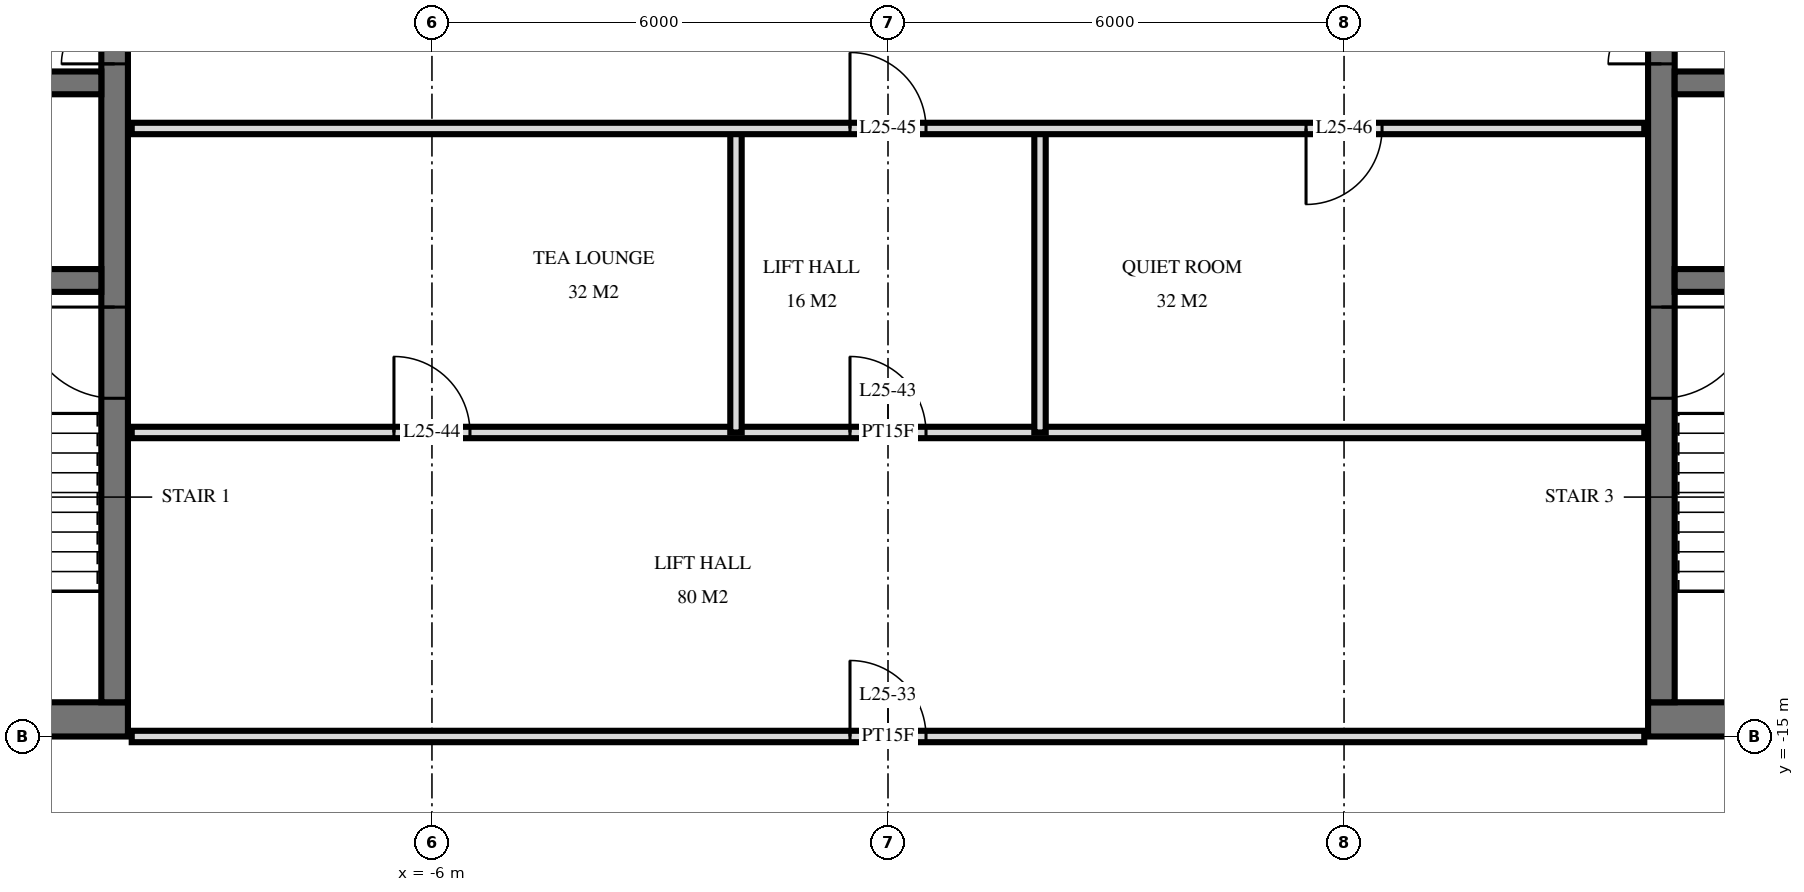
"""IFC4 building model, lengths in metres.
Left out: names, types, materials, properties, quantities, classifications, styles, units other than length and angle.
Written with IfcOpenShell. Run it as: python <this file> out.ifc"""

import sys

from ifc_helpers import new_model, si_unit, direction, frame, frame_2d, origin, place, context, subcontext, project, spatial, rectangle, extrude, element, fill, save


model = new_model("IFC4")
c1 = context("Model", 3, precision=1e-05, world=origin(), true_north=direction((0.0, 1.0)))
c2 = subcontext(c1, "Body", "Model", "MODEL_VIEW")
j1 = project(units=[si_unit("LENGTHUNIT", "METRE"), si_unit("PLANEANGLEUNIT", "RADIAN")], contexts=[c1])
p1 = place(None, origin())
s1 = spatial("IfcSite", under=j1, at=p1, CompositionType="ELEMENT")
p2 = place(p1, origin())
s2 = spatial("IfcBuilding", under=s1, at=p2, CompositionType="ELEMENT")
p3 = place(p2, frame((0.0, 0.0, 99.6)))
s3 = spatial("IfcBuildingStorey", under=s2, at=p3, CompositionType="ELEMENT", Elevation=99.6)
p4 = place(p3, frame((-29.5, -14.775, 0.0), z_axis=(0.0, 0.0, 1.0), x_axis=(1.0, 0.0, 0.0)))
e1 = element("IfcWall", 1, at=p4, inside=s3, PredefinedType="SHEAR", context=c2, shape_type="SweptSolid", body=[
    extrude(rectangle(XDim=19.5, YDim=0.45, at=frame_2d((9.75, 0.0))), origin(), (0.0, 0.0, 1.0), 3.6),
])
p5 = place(p4, frame((11.2, 0.0, 0.0)))
e2 = element("IfcOpeningElement", 2, at=p5, cuts=e1, PredefinedType="OPENING", context=c2, shape_type="SweptSolid", body=[
    extrude(rectangle(XDim=1.2, YDim=2.1, at=frame_2d((0.6, 1.05))), frame((0.0, 0.235, 0.0), z_axis=(0.0, -1.0, 0.0), x_axis=(1.0, 0.0, 0.0)), (0.0, 0.0, 1.0), 0.47),
])
p6 = place(p4, frame((14.25, 0.0, 0.0)))
e3 = element("IfcOpeningElement", 3, at=p6, cuts=e1, PredefinedType="OPENING", context=c2, shape_type="SweptSolid", body=[
    extrude(rectangle(XDim=1.1, YDim=2.1, at=frame_2d((0.55, 1.05))), frame((0.0, 0.235, 0.0), z_axis=(0.0, -1.0, 0.0), x_axis=(1.0, 0.0, 0.0)), (0.0, 0.0, 1.0), 0.47),
])
p7 = place(p4, frame((8.5, 0.0, 0.0)))
e4 = element("IfcOpeningElement", 4, at=p7, cuts=e1, PredefinedType="OPENING", context=c2, shape_type="SweptSolid", body=[
    extrude(rectangle(XDim=0.9, YDim=2.1, at=frame_2d((0.45, 1.05))), frame((0.0, 0.235, 0.0), z_axis=(0.0, -1.0, 0.0), x_axis=(1.0, 0.0, 0.0)), (0.0, 0.0, 1.0), 0.47),
])
p8 = place(p4, frame((6.05, 0.0, 0.0)))
e5 = element("IfcOpeningElement", 5, at=p8, cuts=e1, PredefinedType="OPENING", context=c2, shape_type="SweptSolid", body=[
    extrude(rectangle(XDim=1.0, YDim=2.1, at=frame_2d((0.5, 1.05))), frame((0.0, 0.235, 0.0), z_axis=(0.0, -1.0, 0.0), x_axis=(1.0, 0.0, 0.0)), (0.0, 0.0, 1.0), 0.47),
])
p9 = place(p4, frame((3.413, 0.0, 0.0)))
e6 = element("IfcOpeningElement", 6, at=p9, cuts=e1, PredefinedType="OPENING", context=c2, shape_type="SweptSolid", body=[
    extrude(rectangle(XDim=1.0, YDim=2.1, at=frame_2d((0.5, 1.05))), frame((0.0, 0.235, 0.0), z_axis=(0.0, -1.0, 0.0), x_axis=(1.0, 0.0, 0.0)), (0.0, 0.0, 1.0), 0.47),
])
p10 = place(p4, frame((1.087, 0.0, 0.0)))
e7 = element("IfcOpeningElement", 7, at=p10, cuts=e1, PredefinedType="OPENING", context=c2, shape_type="SweptSolid", body=[
    extrude(rectangle(XDim=1.0, YDim=2.1, at=frame_2d((0.5, 1.05))), frame((0.0, 0.235, 0.0), z_axis=(0.0, -1.0, 0.0), x_axis=(1.0, 0.0, 0.0)), (0.0, 0.0, 1.0), 0.47),
])
p11 = place(p3, frame((-10.175, -14.55, 0.0), z_axis=(0.0, 0.0, 1.0), x_axis=(0.0, 1.0, 0.0)))
e8 = element("IfcWall", 8, at=p11, inside=s3, PredefinedType="SHEAR", context=c2, shape_type="SweptSolid", body=[
    extrude(rectangle(XDim=14.1, YDim=0.35, at=frame_2d((7.05, 0.0))), origin(), (0.0, 0.0, 1.0), 3.6),
])
p12 = place(p11, frame((8.4, 0.0, 0.0)))
e9 = element("IfcOpeningElement", 9, at=p12, cuts=e8, PredefinedType="OPENING", context=c2, shape_type="SweptSolid", body=[
    extrude(rectangle(XDim=1.4, YDim=2.4, at=frame_2d((0.7, 1.2))), frame((0.0, 0.185, 0.0), z_axis=(0.0, -1.0, 0.0), x_axis=(1.0, 0.0, 0.0)), (0.0, 0.0, 1.0), 0.37),
])
p13 = place(p11, frame((10.0, 0.0, 0.0)))
e10 = element("IfcOpeningElement", 10, at=p13, cuts=e8, PredefinedType="OPENING", context=c2, shape_type="SweptSolid", body=[
    extrude(rectangle(XDim=1.4, YDim=2.4, at=frame_2d((0.7, 1.2))), frame((0.0, 0.185, 0.0), z_axis=(0.0, -1.0, 0.0), x_axis=(1.0, 0.0, 0.0)), (0.0, 0.0, 1.0), 0.37),
])
p14 = place(p11, frame((4.0, 0.0, 0.0)))
e11 = element("IfcOpeningElement", 11, at=p14, cuts=e8, PredefinedType="OPENING", context=c2, shape_type="SweptSolid", body=[
    extrude(rectangle(XDim=1.2, YDim=2.1, at=frame_2d((0.6, 1.05))), frame((0.0, 0.185, 0.0), z_axis=(0.0, -1.0, 0.0), x_axis=(1.0, 0.0, 0.0)), (0.0, 0.0, 1.0), 0.37),
])
p15 = place(p3, frame((-29.05, -6.4, 0.0), z_axis=(0.0, 0.0, 1.0), x_axis=(1.0, 0.0, 0.0)))
e12 = element("IfcWall", 12, at=p15, inside=s3, PredefinedType="SHEAR", context=c2, shape_type="SweptSolid", body=[
    extrude(rectangle(XDim=18.7, YDim=0.3, at=frame_2d((9.35, 0.0))), origin(), (0.0, 0.0, 1.0), 3.6),
])
p16 = place(p15, frame((2.95, 0.0, 0.0)))
e13 = element("IfcOpeningElement", 13, at=p16, cuts=e12, PredefinedType="OPENING", context=c2, shape_type="SweptSolid", body=[
    extrude(rectangle(XDim=1.1, YDim=2.1, at=frame_2d((0.55, 1.05))), frame((0.0, 0.16, 0.0), z_axis=(0.0, -1.0, 0.0), x_axis=(1.0, 0.0, 0.0)), (0.0, 0.0, 1.0), 0.32),
])
p17 = place(p15, frame((0.55, 0.0, 0.0)))
e14 = element("IfcOpeningElement", 14, at=p17, cuts=e12, PredefinedType="OPENING", context=c2, shape_type="SweptSolid", body=[
    extrude(rectangle(XDim=1.1, YDim=2.1, at=frame_2d((0.55, 1.05))), frame((0.0, 0.16, 0.0), z_axis=(0.0, -1.0, 0.0), x_axis=(1.0, 0.0, 0.0)), (0.0, 0.0, 1.0), 0.32),
])
p18 = place(p15, frame((10.8, 0.0, 0.0)))
e15 = element("IfcOpeningElement", 15, at=p18, cuts=e12, PredefinedType="OPENING", context=c2, shape_type="SweptSolid", body=[
    extrude(rectangle(XDim=1.1, YDim=2.1, at=frame_2d((0.55, 1.05))), frame((0.0, 0.16, 0.0), z_axis=(0.0, -1.0, 0.0), x_axis=(1.0, 0.0, 0.0)), (0.0, 0.0, 1.0), 0.32),
])
p19 = place(p15, frame((5.6, 0.0, 0.0)))
e16 = element("IfcOpeningElement", 16, at=p19, cuts=e12, PredefinedType="OPENING", context=c2, shape_type="SweptSolid", body=[
    extrude(rectangle(XDim=1.0, YDim=2.1, at=frame_2d((0.5, 1.05))), frame((0.0, 0.16, 0.0), z_axis=(0.0, -1.0, 0.0), x_axis=(1.0, 0.0, 0.0)), (0.0, 0.0, 1.0), 0.32),
])
p20 = place(p3, frame((-29.05, -9.0, 0.0), z_axis=(0.0, 0.0, 1.0), x_axis=(1.0, 0.0, 0.0)))
e17 = element("IfcWall", 17, at=p20, inside=s3, PredefinedType="SHEAR", context=c2, shape_type="SweptSolid", body=[
    extrude(rectangle(XDim=18.7, YDim=0.3, at=frame_2d((9.35, 0.0))), origin(), (0.0, 0.0, 1.0), 3.6),
])
p21 = place(p20, frame((13.8, 0.0, 0.0)))
e18 = element("IfcOpeningElement", 18, at=p21, cuts=e17, PredefinedType="OPENING", context=c2, shape_type="SweptSolid", body=[
    extrude(rectangle(XDim=1.1, YDim=2.1, at=frame_2d((0.55, 1.05))), frame((0.0, 0.16, 0.0), z_axis=(0.0, -1.0, 0.0), x_axis=(1.0, 0.0, 0.0)), (0.0, 0.0, 1.0), 0.32),
])
p22 = place(p3, frame((10.0, -14.775, 0.0), z_axis=(0.0, 0.0, 1.0), x_axis=(1.0, 0.0, 0.0)))
e19 = element("IfcWall", 19, at=p22, inside=s3, PredefinedType="SHEAR", context=c2, shape_type="SweptSolid", body=[
    extrude(rectangle(XDim=19.5, YDim=0.45, at=frame_2d((9.75, 0.0))), origin(), (0.0, 0.0, 1.0), 3.6),
])
p23 = place(p22, frame((7.1, 0.0, 0.0)))
e20 = element("IfcOpeningElement", 20, at=p23, cuts=e19, PredefinedType="OPENING", context=c2, shape_type="SweptSolid", body=[
    extrude(rectangle(XDim=1.2, YDim=2.1, at=frame_2d((0.6, 1.05))), frame((0.0, 0.235, 0.0), z_axis=(0.0, -1.0, 0.0), x_axis=(1.0, 0.0, 0.0)), (0.0, 0.0, 1.0), 0.47),
])
p24 = place(p22, frame((4.15, 0.0, 0.0)))
e21 = element("IfcOpeningElement", 21, at=p24, cuts=e19, PredefinedType="OPENING", context=c2, shape_type="SweptSolid", body=[
    extrude(rectangle(XDim=1.1, YDim=2.1, at=frame_2d((0.55, 1.05))), frame((0.0, 0.235, 0.0), z_axis=(0.0, -1.0, 0.0), x_axis=(1.0, 0.0, 0.0)), (0.0, 0.0, 1.0), 0.47),
])
p25 = place(p22, frame((10.1, 0.0, 0.0)))
e22 = element("IfcOpeningElement", 22, at=p25, cuts=e19, PredefinedType="OPENING", context=c2, shape_type="SweptSolid", body=[
    extrude(rectangle(XDim=0.9, YDim=2.1, at=frame_2d((0.45, 1.05))), frame((0.0, 0.235, 0.0), z_axis=(0.0, -1.0, 0.0), x_axis=(1.0, 0.0, 0.0)), (0.0, 0.0, 1.0), 0.47),
])
p26 = place(p22, frame((12.45, 0.0, 0.0)))
e23 = element("IfcOpeningElement", 23, at=p26, cuts=e19, PredefinedType="OPENING", context=c2, shape_type="SweptSolid", body=[
    extrude(rectangle(XDim=1.0, YDim=2.1, at=frame_2d((0.5, 1.05))), frame((0.0, 0.235, 0.0), z_axis=(0.0, -1.0, 0.0), x_axis=(1.0, 0.0, 0.0)), (0.0, 0.0, 1.0), 0.47),
])
p27 = place(p22, frame((15.087, 0.0, 0.0)))
e24 = element("IfcOpeningElement", 24, at=p27, cuts=e19, PredefinedType="OPENING", context=c2, shape_type="SweptSolid", body=[
    extrude(rectangle(XDim=1.0, YDim=2.1, at=frame_2d((0.5, 1.05))), frame((0.0, 0.235, 0.0), z_axis=(0.0, -1.0, 0.0), x_axis=(1.0, 0.0, 0.0)), (0.0, 0.0, 1.0), 0.47),
])
p28 = place(p22, frame((17.413, 0.0, 0.0)))
e25 = element("IfcOpeningElement", 25, at=p28, cuts=e19, PredefinedType="OPENING", context=c2, shape_type="SweptSolid", body=[
    extrude(rectangle(XDim=1.0, YDim=2.1, at=frame_2d((0.5, 1.05))), frame((0.0, 0.235, 0.0), z_axis=(0.0, -1.0, 0.0), x_axis=(1.0, 0.0, 0.0)), (0.0, 0.0, 1.0), 0.47),
])
p29 = place(p3, frame((10.175, -14.55, 0.0), z_axis=(0.0, 0.0, 1.0), x_axis=(0.0, 1.0, 0.0)))
e26 = element("IfcWall", 26, at=p29, inside=s3, PredefinedType="SHEAR", context=c2, shape_type="SweptSolid", body=[
    extrude(rectangle(XDim=14.1, YDim=0.35, at=frame_2d((7.05, 0.0))), origin(), (0.0, 0.0, 1.0), 3.6),
])
p30 = place(p29, frame((8.4, 0.0, 0.0)))
e27 = element("IfcOpeningElement", 27, at=p30, cuts=e26, PredefinedType="OPENING", context=c2, shape_type="SweptSolid", body=[
    extrude(rectangle(XDim=1.4, YDim=2.4, at=frame_2d((0.7, 1.2))), frame((0.0, 0.185, 0.0), z_axis=(0.0, -1.0, 0.0), x_axis=(1.0, 0.0, 0.0)), (0.0, 0.0, 1.0), 0.37),
])
p31 = place(p29, frame((10.0, 0.0, 0.0)))
e28 = element("IfcOpeningElement", 28, at=p31, cuts=e26, PredefinedType="OPENING", context=c2, shape_type="SweptSolid", body=[
    extrude(rectangle(XDim=1.4, YDim=2.4, at=frame_2d((0.7, 1.2))), frame((0.0, 0.185, 0.0), z_axis=(0.0, -1.0, 0.0), x_axis=(1.0, 0.0, 0.0)), (0.0, 0.0, 1.0), 0.37),
])
p32 = place(p29, frame((4.0, 0.0, 0.0)))
e29 = element("IfcOpeningElement", 29, at=p32, cuts=e26, PredefinedType="OPENING", context=c2, shape_type="SweptSolid", body=[
    extrude(rectangle(XDim=1.2, YDim=2.1, at=frame_2d((0.6, 1.05))), frame((0.0, 0.185, 0.0), z_axis=(0.0, -1.0, 0.0), x_axis=(1.0, 0.0, 0.0)), (0.0, 0.0, 1.0), 0.37),
])
p33 = place(p3, frame((10.35, -6.4, 0.0), z_axis=(0.0, 0.0, 1.0), x_axis=(1.0, 0.0, 0.0)))
e30 = element("IfcWall", 30, at=p33, inside=s3, PredefinedType="SHEAR", context=c2, shape_type="SweptSolid", body=[
    extrude(rectangle(XDim=18.7, YDim=0.3, at=frame_2d((9.35, 0.0))), origin(), (0.0, 0.0, 1.0), 3.6),
])
p34 = place(p33, frame((14.65, 0.0, 0.0)))
e31 = element("IfcOpeningElement", 31, at=p34, cuts=e30, PredefinedType="OPENING", context=c2, shape_type="SweptSolid", body=[
    extrude(rectangle(XDim=1.1, YDim=2.1, at=frame_2d((0.55, 1.05))), frame((0.0, 0.16, 0.0), z_axis=(0.0, -1.0, 0.0), x_axis=(1.0, 0.0, 0.0)), (0.0, 0.0, 1.0), 0.32),
])
p35 = place(p33, frame((17.05, 0.0, 0.0)))
e32 = element("IfcOpeningElement", 32, at=p35, cuts=e30, PredefinedType="OPENING", context=c2, shape_type="SweptSolid", body=[
    extrude(rectangle(XDim=1.1, YDim=2.1, at=frame_2d((0.55, 1.05))), frame((0.0, 0.16, 0.0), z_axis=(0.0, -1.0, 0.0), x_axis=(1.0, 0.0, 0.0)), (0.0, 0.0, 1.0), 0.32),
])
p36 = place(p33, frame((6.8, 0.0, 0.0)))
e33 = element("IfcOpeningElement", 33, at=p36, cuts=e30, PredefinedType="OPENING", context=c2, shape_type="SweptSolid", body=[
    extrude(rectangle(XDim=1.1, YDim=2.1, at=frame_2d((0.55, 1.05))), frame((0.0, 0.16, 0.0), z_axis=(0.0, -1.0, 0.0), x_axis=(1.0, 0.0, 0.0)), (0.0, 0.0, 1.0), 0.32),
])
p37 = place(p33, frame((12.1, 0.0, 0.0)))
e34 = element("IfcOpeningElement", 34, at=p37, cuts=e30, PredefinedType="OPENING", context=c2, shape_type="SweptSolid", body=[
    extrude(rectangle(XDim=1.0, YDim=2.1, at=frame_2d((0.5, 1.05))), frame((0.0, 0.16, 0.0), z_axis=(0.0, -1.0, 0.0), x_axis=(1.0, 0.0, 0.0)), (0.0, 0.0, 1.0), 0.32),
])
p38 = place(p3, frame((10.35, -9.0, 0.0), z_axis=(0.0, 0.0, 1.0), x_axis=(1.0, 0.0, 0.0)))
e35 = element("IfcWall", 35, at=p38, inside=s3, PredefinedType="SHEAR", context=c2, shape_type="SweptSolid", body=[
    extrude(rectangle(XDim=18.7, YDim=0.3, at=frame_2d((9.35, 0.0))), origin(), (0.0, 0.0, 1.0), 3.6),
])
p39 = place(p38, frame((3.8, 0.0, 0.0)))
e36 = element("IfcOpeningElement", 36, at=p39, cuts=e35, PredefinedType="OPENING", context=c2, shape_type="SweptSolid", body=[
    extrude(rectangle(XDim=1.1, YDim=2.1, at=frame_2d((0.55, 1.05))), frame((0.0, 0.16, 0.0), z_axis=(0.0, -1.0, 0.0), x_axis=(1.0, 0.0, 0.0)), (0.0, 0.0, 1.0), 0.32),
])
for number, where, z_axis, x_axis in (
    (37, (2.0, -11.0, 0.0), (0.0, 0.0, 1.0), (0.0, 1.0, 0.0)),
    (38, (-2.0, -11.0, 0.0), (0.0, 0.0, 1.0), (0.0, 1.0, 0.0)),
):
    element("IfcWall", number, at=place(p3, frame(where, z_axis=z_axis, x_axis=x_axis)), inside=s3, PredefinedType="PARTITIONING", context=c2, shape_type="SweptSolid", body=[
        extrude(rectangle(XDim=4.0, YDim=0.15, at=frame_2d((2.0, 0.0))), origin(), (0.0, 0.0, 1.0), 3.32),
    ])
p40 = place(p3, frame((-9.95, -15.0, 0.0), z_axis=(0.0, 0.0, 1.0), x_axis=(1.0, 0.0, 0.0)))
e39 = element("IfcWall", 39, at=p40, inside=s3, PredefinedType="PARTITIONING", context=c2, shape_type="SweptSolid", body=[
    extrude(rectangle(XDim=19.9, YDim=0.15, at=frame_2d((9.95, 0.0))), origin(), (0.0, 0.0, 1.0), 2.684),
])
p41 = place(p40, frame((9.45, 0.0, 0.0)))
e40 = element("IfcOpeningElement", 40, at=p41, cuts=e39, PredefinedType="OPENING", context=c2, shape_type="SweptSolid", body=[
    extrude(rectangle(XDim=1.0, YDim=2.1, at=frame_2d((0.5, 1.05))), frame((0.0, 0.085, 0.0), z_axis=(0.0, -1.0, 0.0), x_axis=(1.0, 0.0, 0.0)), (0.0, 0.0, 1.0), 0.17),
])
p42 = place(p3, frame((-9.95, -11.0, 0.0), z_axis=(0.0, 0.0, 1.0), x_axis=(1.0, 0.0, 0.0)))
e41 = element("IfcWall", 41, at=p42, inside=s3, PredefinedType="PARTITIONING", context=c2, shape_type="SweptSolid", body=[
    extrude(rectangle(XDim=19.9, YDim=0.15, at=frame_2d((9.95, 0.0))), origin(), (0.0, 0.0, 1.0), 3.32),
])
p43 = place(p42, frame((9.45, 0.0, 0.0)))
e42 = element("IfcOpeningElement", 42, at=p43, cuts=e41, PredefinedType="OPENING", context=c2, shape_type="SweptSolid", body=[
    extrude(rectangle(XDim=1.0, YDim=2.1, at=frame_2d((0.5, 1.05))), frame((0.0, 0.085, 0.0), z_axis=(0.0, -1.0, 0.0), x_axis=(1.0, 0.0, 0.0)), (0.0, 0.0, 1.0), 0.17),
])
p44 = place(p42, frame((3.45, 0.0, 0.0)))
e43 = element("IfcOpeningElement", 43, at=p44, cuts=e41, PredefinedType="OPENING", context=c2, shape_type="SweptSolid", body=[
    extrude(rectangle(XDim=1.0, YDim=2.1, at=frame_2d((0.5, 1.05))), frame((0.0, 0.085, 0.0), z_axis=(0.0, -1.0, 0.0), x_axis=(1.0, 0.0, 0.0)), (0.0, 0.0, 1.0), 0.17),
])
p45 = place(p3, frame((-9.95, -7.0, 0.0), z_axis=(0.0, 0.0, 1.0), x_axis=(1.0, 0.0, 0.0)))
e44 = element("IfcWall", 44, at=p45, inside=s3, PredefinedType="PARTITIONING", context=c2, shape_type="SweptSolid", body=[
    extrude(rectangle(XDim=19.9, YDim=0.15, at=frame_2d((9.95, 0.0))), origin(), (0.0, 0.0, 1.0), 3.32),
])
p46 = place(p45, frame((9.45, 0.0, 0.0)))
e45 = element("IfcOpeningElement", 45, at=p46, cuts=e44, PredefinedType="OPENING", context=c2, shape_type="SweptSolid", body=[
    extrude(rectangle(XDim=1.0, YDim=2.1, at=frame_2d((0.5, 1.05))), frame((0.0, 0.085, 0.0), z_axis=(0.0, -1.0, 0.0), x_axis=(1.0, 0.0, 0.0)), (0.0, 0.0, 1.0), 0.17),
])
p47 = place(p45, frame((15.45, 0.0, 0.0)))
e46 = element("IfcOpeningElement", 46, at=p47, cuts=e44, PredefinedType="OPENING", context=c2, shape_type="SweptSolid", body=[
    extrude(rectangle(XDim=1.0, YDim=2.1, at=frame_2d((0.5, 1.05))), frame((0.0, 0.085, 0.0), z_axis=(0.0, -1.0, 0.0), x_axis=(1.0, 0.0, 0.0)), (0.0, 0.0, 1.0), 0.17),
])
p48 = place(p12, origin())
e47 = element("IfcDoor", 47, at=p48, inside=s3, OperationType="DOUBLE_DOOR_SINGLE_SWING", PredefinedType="DOOR", context=c2, shape_type="SweptSolid", body=[
    extrude(rectangle(XDim=1.4, YDim=2.4, at=frame_2d((0.7, 1.2))), frame((0.0, 0.025, 0.0), z_axis=(0.0, -1.0, 0.0), x_axis=(1.0, 0.0, 0.0)), (0.0, 0.0, 1.0), 0.05),
])
fill(e9, e47)
p49 = place(p14, origin())
e48 = element("IfcDoor", 48, at=p49, inside=s3, OperationType="SINGLE_SWING_LEFT", PredefinedType="DOOR", context=c2, shape_type="SweptSolid", body=[
    extrude(rectangle(XDim=1.2, YDim=2.1, at=frame_2d((0.6, 1.05))), frame((0.0, 0.025, 0.0), z_axis=(0.0, -1.0, 0.0), x_axis=(1.0, 0.0, 0.0)), (0.0, 0.0, 1.0), 0.05),
])
fill(e11, e48)
p50 = place(p30, origin())
e49 = element("IfcDoor", 49, at=p50, inside=s3, OperationType="DOUBLE_DOOR_SINGLE_SWING", PredefinedType="DOOR", context=c2, shape_type="SweptSolid", body=[
    extrude(rectangle(XDim=1.4, YDim=2.4, at=frame_2d((0.7, 1.2))), frame((0.0, 0.025, 0.0), z_axis=(0.0, -1.0, 0.0), x_axis=(1.0, 0.0, 0.0)), (0.0, 0.0, 1.0), 0.05),
])
fill(e27, e49)
p51 = place(p32, frame((0.6, 0.0, 0.0), z_axis=(0.0, 0.0, 1.0), x_axis=(-1.0, 0.0, 0.0)))
e50 = element("IfcDoor", 50, at=p51, inside=s3, OperationType="SINGLE_SWING_RIGHT", PredefinedType="DOOR", context=c2, shape_type="SweptSolid", body=[
    extrude(rectangle(XDim=1.2, YDim=2.1, at=frame_2d((0.0, 1.05))), frame((0.0, -0.025, 0.0), z_axis=(0.0, 1.0, 0.0), x_axis=(-1.0, 0.0, 0.0)), (0.0, 0.0, 1.0), 0.05),
])
fill(e29, e50)
p52 = place(p41, origin())
e51 = element("IfcDoor", 51, at=p52, inside=s3, OperationType="SINGLE_SWING_RIGHT", PredefinedType="DOOR", context=c2, shape_type="SweptSolid", body=[
    extrude(rectangle(XDim=1.0, YDim=2.1, at=frame_2d((0.5, 1.05))), frame((0.0, 0.025, 0.0), z_axis=(0.0, -1.0, 0.0), x_axis=(1.0, 0.0, 0.0)), (0.0, 0.0, 1.0), 0.05),
])
fill(e40, e51)
p53 = place(p43, origin())
e52 = element("IfcDoor", 52, at=p53, inside=s3, OperationType="SINGLE_SWING_RIGHT", PredefinedType="DOOR", context=c2, shape_type="SweptSolid", body=[
    extrude(rectangle(XDim=1.0, YDim=2.1, at=frame_2d((0.5, 1.05))), frame((0.0, 0.025, 0.0), z_axis=(0.0, -1.0, 0.0), x_axis=(1.0, 0.0, 0.0)), (0.0, 0.0, 1.0), 0.05),
])
fill(e42, e52)
p54 = place(p44, origin())
e53 = element("IfcDoor", 53, at=p54, inside=s3, OperationType="SINGLE_SWING_RIGHT", PredefinedType="DOOR", context=c2, shape_type="SweptSolid", body=[
    extrude(rectangle(XDim=1.0, YDim=2.1, at=frame_2d((0.5, 1.05))), frame((0.0, 0.025, 0.0), z_axis=(0.0, -1.0, 0.0), x_axis=(1.0, 0.0, 0.0)), (0.0, 0.0, 1.0), 0.05),
])
fill(e43, e53)
p55 = place(p46, origin())
e54 = element("IfcDoor", 54, at=p55, inside=s3, OperationType="SINGLE_SWING_RIGHT", PredefinedType="DOOR", context=c2, shape_type="SweptSolid", body=[
    extrude(rectangle(XDim=1.0, YDim=2.1, at=frame_2d((0.5, 1.05))), frame((0.0, 0.025, 0.0), z_axis=(0.0, -1.0, 0.0), x_axis=(1.0, 0.0, 0.0)), (0.0, 0.0, 1.0), 0.05),
])
fill(e45, e54)
p56 = place(p47, frame((0.5, 0.0, 0.0), z_axis=(0.0, 0.0, 1.0), x_axis=(-1.0, 0.0, 0.0)))
e55 = element("IfcDoor", 55, at=p56, inside=s3, OperationType="SINGLE_SWING_LEFT", PredefinedType="DOOR", context=c2, shape_type="SweptSolid", body=[
    extrude(rectangle(XDim=1.0, YDim=2.1, at=frame_2d((0.0, 1.05))), frame((0.0, -0.025, 0.0), z_axis=(0.0, 1.0, 0.0), x_axis=(-1.0, 0.0, 0.0)), (0.0, 0.0, 1.0), 0.05),
])
fill(e46, e55)
save(model, sys.argv[1])
